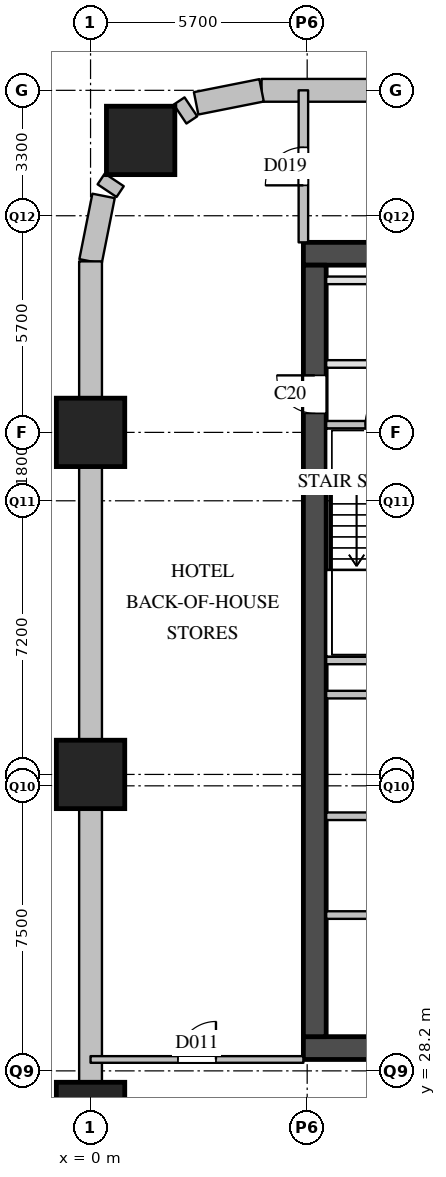
"""IFC4 building model, lengths in metres.
Left out: names, types, materials, properties, quantities, classifications, styles, units other than length and angle.
Written with IfcOpenShell. Run it as: python <this file> out.ifc"""

import sys

from ifc_helpers import new_model, si_unit, direction, frame, frame_2d, origin, origin_2d, place, context, subcontext, project, spatial, rectangle, extrude, element, fill, save


model = new_model("IFC4")
c1 = context("Model", 3, precision=1e-05, world=origin(), true_north=direction((0.0, 1.0)))
c2 = subcontext(c1, "Body", "Model", "MODEL_VIEW")
j1 = project(units=[si_unit("LENGTHUNIT", "METRE"), si_unit("PLANEANGLEUNIT", "RADIAN")], contexts=[c1])
p1 = place(None, origin())
s1 = spatial("IfcSite", under=j1, at=p1, CompositionType="ELEMENT")
p2 = place(p1, origin())
s2 = spatial("IfcBuilding", under=s1, at=p2, CompositionType="ELEMENT")
p3 = place(p2, frame((0.0, 0.0, -6.0)))
s3 = spatial("IfcBuildingStorey", under=s2, at=p3, CompositionType="ELEMENT", Elevation=-6.0)
for number, where, z_axis, x_axis in (
    (1, (0.0, 27.0, 0.0), (0.0, 0.0, 1.0), (1.0, 0.0, 0.0)),
    (2, (0.0, 36.0, 0.0), (0.0, 0.0, 1.0), (1.0, 0.0, 0.0)),
    (3, (0.0, 45.0, 0.0), (0.0, 0.0, 1.0), (1.0, 0.0, 0.0)),
    (4, (1.318, 52.682, 0.0), (0.0, 0.0, 1.0), (1.0, 0.0, 0.0)),
):
    element("IfcColumn", number, at=place(p3, frame(where, z_axis=z_axis, x_axis=x_axis)), inside=s3, PredefinedType="COLUMN", context=c2, shape_type="SweptSolid", body=[
        extrude(rectangle(XDim=1.8, YDim=1.8, at=origin_2d()), origin(), (0.0, 0.0, 1.0), 6.0),
    ])
p4 = place(p3, frame((8.1, 54.0, 0.0), z_axis=(0.0, 0.0, 1.0), x_axis=(-1.0, 0.0, 0.0)))
e5 = element("IfcWall", 5, at=p4, inside=s3, PredefinedType="SOLIDWALL", context=c2, shape_type="SweptSolid", body=[
    extrude(rectangle(XDim=3.6, YDim=0.6, at=frame_2d((1.8, 0.0))), origin(), (0.0, 0.0, 1.0), 5.59),
])
p5 = place(p3, frame((4.5, 54.0, 0.0), z_axis=(0.0, 0.0, 1.0), x_axis=(-0.980788681317, -0.195073223687, 0.0)))
e6 = element("IfcWall", 6, at=p5, inside=s3, PredefinedType="SOLIDWALL", context=c2, shape_type="SweptSolid", body=[
    extrude(rectangle(XDim=1.756, YDim=0.6, at=frame_2d((0.878, 0.0))), origin(), (0.0, 0.0, 1.0), 5.59),
])
for number, where, z_axis, x_axis in (
    (7, (2.64, 53.565, 0.0), (0.0, 0.0, 1.0), (-0.831, -0.556, 0.0)),
    (8, (0.625, 51.644, 0.0), (0.0, 0.0, 1.0), (-0.556, -0.831, 0.0)),
):
    element("IfcWall", number, at=place(p3, frame(where, z_axis=z_axis, x_axis=x_axis)), inside=s3, PredefinedType="SOLIDWALL", context=c2, shape_type="SweptSolid", body=[
        extrude(rectangle(XDim=0.342, YDim=0.6, at=frame_2d((0.171, 0.0))), origin(), (0.0, 0.0, 1.0), 5.59),
    ])
p6 = place(p3, frame((0.343, 51.222, 0.0), z_axis=(0.0, 0.0, 1.0), x_axis=(-0.195073223687, -0.980788681317, 0.0)))
e9 = element("IfcWall", 9, at=p6, inside=s3, PredefinedType="SOLIDWALL", context=c2, shape_type="SweptSolid", body=[
    extrude(rectangle(XDim=1.756, YDim=0.6, at=frame_2d((0.878, 0.0))), origin(), (0.0, 0.0, 1.0), 5.59),
])
p7 = place(p3, frame((0.0, 49.5, 0.0), z_axis=(0.0, 0.0, 1.0), x_axis=(0.0, -1.0, 0.0)))
e10 = element("IfcWall", 10, at=p7, inside=s3, PredefinedType="SOLIDWALL", context=c2, shape_type="SweptSolid", body=[
    extrude(rectangle(XDim=3.6, YDim=0.6, at=frame_2d((1.8, 0.0))), origin(), (0.0, 0.0, 1.0), 5.59),
])
for number, where, z_axis, x_axis in (
    (11, (0.0, 44.1, 0.0), (0.0, 0.0, 1.0), (0.0, -1.0, 0.0)),
    (12, (0.0, 35.1, 0.0), (0.0, 0.0, 1.0), (0.0, -1.0, 0.0)),
):
    element("IfcWall", number, at=place(p3, frame(where, z_axis=z_axis, x_axis=x_axis)), inside=s3, PredefinedType="SOLIDWALL", context=c2, shape_type="SweptSolid", body=[
        extrude(rectangle(XDim=7.2, YDim=0.6, at=frame_2d((3.6, 0.0))), origin(), (0.0, 0.0, 1.0), 5.59),
    ])
for number, where, z_axis, x_axis in (
    (13, (5.6, 28.8, 0.0), (0.0, 0.0, 1.0), (1.0, 0.0, 0.0)),
    (14, (5.6, 49.7, 0.0), (0.0, 0.0, 1.0), (1.0, 0.0, 0.0)),
):
    element("IfcWall", number, at=place(p3, frame(where, z_axis=z_axis, x_axis=x_axis)), inside=s3, PredefinedType="SHEAR", context=c2, shape_type="SweptSolid", body=[
        extrude(rectangle(XDim=12.4, YDim=0.6, at=frame_2d((6.2, 0.0))), origin(), (0.0, 0.0, 1.0), 5.59),
    ])
p8 = place(p3, frame((5.9, 29.1, 0.0), z_axis=(0.0, 0.0, 1.0), x_axis=(0.0, 1.0, 0.0)))
e15 = element("IfcWall", 15, at=p8, inside=s3, PredefinedType="SHEAR", context=c2, shape_type="SweptSolid", body=[
    extrude(rectangle(XDim=20.3, YDim=0.6, at=frame_2d((10.15, 0.0))), origin(), (0.0, 0.0, 1.0), 5.59),
])
p9 = place(p8, frame((16.4, 0.0, 0.0)))
e16 = element("IfcOpeningElement", 16, at=p9, cuts=e15, PredefinedType="OPENING", context=c2, shape_type="SweptSolid", body=[
    extrude(rectangle(XDim=1.0, YDim=2.1, at=frame_2d((0.5, 1.05))), frame((0.0, 0.31, 0.0), z_axis=(0.0, -1.0, 0.0), x_axis=(1.0, 0.0, 0.0)), (0.0, 0.0, 1.0), 0.62),
])
for number, where, z_axis, x_axis in (
    (17, (6.2, 32.3, 0.0), (0.0, 0.0, 1.0), (1.0, 0.0, 0.0)),
    (18, (6.2, 34.9, 0.0), (0.0, 0.0, 1.0), (1.0, 0.0, 0.0)),
    (19, (6.2, 38.1, 0.0), (0.0, 0.0, 1.0), (1.0, 0.0, 0.0)),
):
    element("IfcWall", number, at=place(p3, frame(where, z_axis=z_axis, x_axis=x_axis)), inside=s3, PredefinedType="SOLIDWALL", context=c2, shape_type="SweptSolid", body=[
        extrude(rectangle(XDim=10.5, YDim=0.2, at=frame_2d((5.25, 0.0))), origin(), (0.0, 0.0, 1.0), 5.59),
    ])
p10 = place(p3, frame((6.2, 39.0, 0.0), z_axis=(0.0, 0.0, 1.0), x_axis=(1.0, 0.0, 0.0)))
e20 = element("IfcWall", 20, at=p10, inside=s3, PredefinedType="SOLIDWALL", context=c2, shape_type="SweptSolid", body=[
    extrude(rectangle(XDim=3.05, YDim=0.2, at=frame_2d((1.525, 0.0))), origin(), (0.0, 0.0, 1.0), 5.59),
])
p11 = place(p3, frame((6.2, 45.2, 0.0), z_axis=(0.0, 0.0, 1.0), x_axis=(1.0, 0.0, 0.0)))
e21 = element("IfcWall", 21, at=p11, inside=s3, PredefinedType="SOLIDWALL", context=c2, shape_type="SweptSolid", body=[
    extrude(rectangle(XDim=3.05, YDim=0.2, at=frame_2d((1.525, 0.0))), origin(), (0.0, 0.0, 1.0), 5.59),
])
p12 = place(p11, frame((1.025, 0.0, 0.0)))
e22 = element("IfcOpeningElement", 22, at=p12, cuts=e21, PredefinedType="OPENING", context=c2, shape_type="SweptSolid", body=[
    extrude(rectangle(XDim=1.1, YDim=2.1, at=frame_2d((0.55, 1.05))), frame((0.0, 0.11, 0.0), z_axis=(0.0, -1.0, 0.0), x_axis=(1.0, 0.0, 0.0)), (0.0, 0.0, 1.0), 0.22),
])
p13 = place(p3, frame((6.2, 46.8, 0.0), z_axis=(0.0, 0.0, 1.0), x_axis=(1.0, 0.0, 0.0)))
e23 = element("IfcWall", 23, at=p13, inside=s3, PredefinedType="PARTITIONING", context=c2, shape_type="SweptSolid", body=[
    extrude(rectangle(XDim=11.2, YDim=0.2, at=frame_2d((5.6, 0.0))), origin(), (0.0, 0.0, 1.0), 5.59),
])
p14 = place(p13, frame((2.05, 0.0, 0.0)))
e24 = element("IfcOpeningElement", 24, at=p14, cuts=e23, PredefinedType="OPENING", context=c2, shape_type="SweptSolid", body=[
    extrude(rectangle(XDim=1.5, YDim=2.1, at=frame_2d((0.75, 1.05))), frame((0.0, 0.11, 0.0), z_axis=(0.0, -1.0, 0.0), x_axis=(1.0, 0.0, 0.0)), (0.0, 0.0, 1.0), 0.22),
])
p15 = place(p13, frame((7.65, 0.0, 0.0)))
e25 = element("IfcOpeningElement", 25, at=p15, cuts=e23, PredefinedType="OPENING", context=c2, shape_type="SweptSolid", body=[
    extrude(rectangle(XDim=1.5, YDim=2.1, at=frame_2d((0.75, 1.05))), frame((0.0, 0.11, 0.0), z_axis=(0.0, -1.0, 0.0), x_axis=(1.0, 0.0, 0.0)), (0.0, 0.0, 1.0), 0.22),
])
p16 = place(p3, frame((6.2, 49.0, 0.0), z_axis=(0.0, 0.0, 1.0), x_axis=(1.0, 0.0, 0.0)))
e26 = element("IfcWall", 26, at=p16, inside=s3, PredefinedType="PARTITIONING", context=c2, shape_type="SweptSolid", body=[
    extrude(rectangle(XDim=11.2, YDim=0.2, at=frame_2d((5.6, 0.0))), origin(), (0.0, 0.0, 1.0), 5.59),
])
p17 = place(p3, frame((0.0, 28.5, 0.0), z_axis=(0.0, 0.0, 1.0), x_axis=(1.0, 0.0, 0.0)))
e27 = element("IfcWall", 27, at=p17, inside=s3, PredefinedType="PARTITIONING", context=c2, shape_type="SweptSolid", body=[
    extrude(rectangle(XDim=5.6, YDim=0.175, at=frame_2d((2.8, 0.0))), origin(), (0.0, 0.0, 1.0), 5.59),
])
p18 = place(p17, frame((2.3, 0.0, 0.0)))
e28 = element("IfcOpeningElement", 28, at=p18, cuts=e27, PredefinedType="OPENING", context=c2, shape_type="SweptSolid", body=[
    extrude(rectangle(XDim=1.0, YDim=2.1, at=frame_2d((0.5, 1.05))), frame((0.0, 0.097, 0.0), z_axis=(0.0, -1.0, 0.0), x_axis=(1.0, 0.0, 0.0)), (0.0, 0.0, 1.0), 0.195),
])
p19 = place(p3, frame((5.6, 50.0, 0.0), z_axis=(0.0, 0.0, 1.0), x_axis=(0.0, 1.0, 0.0)))
e29 = element("IfcWall", 29, at=p19, inside=s3, PredefinedType="PARTITIONING", context=c2, shape_type="SweptSolid", body=[
    extrude(rectangle(XDim=4.0, YDim=0.25, at=frame_2d((2.0, 0.0))), origin(), (0.0, 0.0, 1.0), 5.59),
])
p20 = place(p19, frame((1.5, 0.0, 0.0)))
e30 = element("IfcOpeningElement", 30, at=p20, cuts=e29, PredefinedType="OPENING", context=c2, shape_type="SweptSolid", body=[
    extrude(rectangle(XDim=1.0, YDim=2.1, at=frame_2d((0.5, 1.05))), frame((0.0, 0.135, 0.0), z_axis=(0.0, -1.0, 0.0), x_axis=(1.0, 0.0, 0.0)), (0.0, 0.0, 1.0), 0.27),
])
p21 = place(p12, origin())
e31 = element("IfcDoor", 31, at=p21, inside=s3, OperationType="SINGLE_SWING_RIGHT", PredefinedType="DOOR", context=c2, shape_type="SweptSolid", body=[
    extrude(rectangle(XDim=1.1, YDim=2.1, at=frame_2d((0.55, 1.05))), frame((0.0, 0.025, 0.0), z_axis=(0.0, -1.0, 0.0), x_axis=(1.0, 0.0, 0.0)), (0.0, 0.0, 1.0), 0.05),
])
fill(e22, e31)
p22 = place(p9, origin())
e32 = element("IfcDoor", 32, at=p22, inside=s3, OperationType="SINGLE_SWING_RIGHT", PredefinedType="DOOR", context=c2, shape_type="SweptSolid", body=[
    extrude(rectangle(XDim=1.0, YDim=2.1, at=frame_2d((0.5, 1.05))), frame((0.0, 0.025, 0.0), z_axis=(0.0, -1.0, 0.0), x_axis=(1.0, 0.0, 0.0)), (0.0, 0.0, 1.0), 0.05),
])
fill(e16, e32)
p23 = place(p18, origin())
e33 = element("IfcDoor", 33, at=p23, inside=s3, OperationType="SINGLE_SWING_RIGHT", PredefinedType="DOOR", context=c2, shape_type="SweptSolid", body=[
    extrude(rectangle(XDim=1.0, YDim=2.1, at=frame_2d((0.5, 1.05))), frame((0.0, 0.025, 0.0), z_axis=(0.0, -1.0, 0.0), x_axis=(1.0, 0.0, 0.0)), (0.0, 0.0, 1.0), 0.05),
])
fill(e28, e33)
p24 = place(p20, origin())
e34 = element("IfcDoor", 34, at=p24, inside=s3, OperationType="SINGLE_SWING_LEFT", PredefinedType="DOOR", context=c2, shape_type="SweptSolid", body=[
    extrude(rectangle(XDim=1.0, YDim=2.1, at=frame_2d((0.5, 1.05))), frame((0.0, 0.025, 0.0), z_axis=(0.0, -1.0, 0.0), x_axis=(1.0, 0.0, 0.0)), (0.0, 0.0, 1.0), 0.05),
])
fill(e30, e34)
save(model, sys.argv[1])
